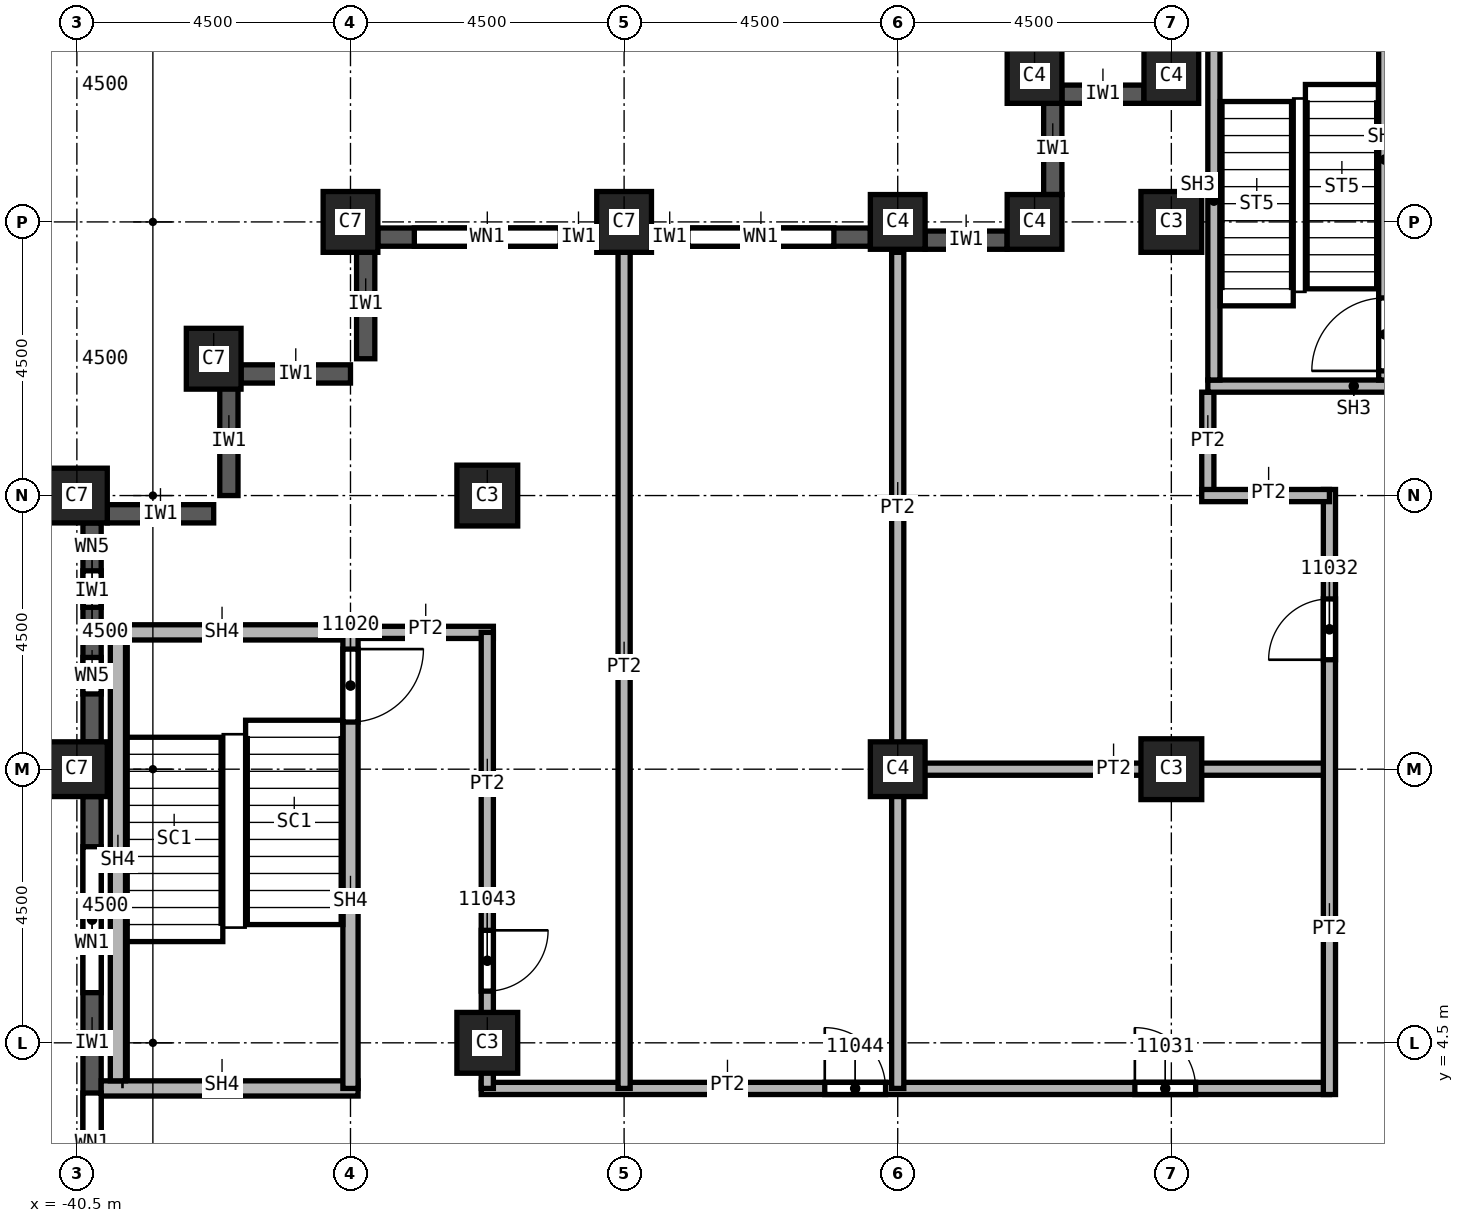
"""IFC4 building model, lengths in metres.
Left out: names, types, materials, properties, quantities, classifications, styles, units other than length and angle.
Written with IfcOpenShell. Run it as: python <this file> out.ifc"""

import sys

from ifc_helpers import new_model, si_unit, direction, frame, frame_2d, origin, origin_2d, place, context, subcontext, project, spatial, rectangle, extrude, element, fill, save


model = new_model("IFC4")
c1 = context("Model", 3, precision=1e-05, world=origin(), true_north=direction((0.0, 1.0)))
c2 = subcontext(c1, "Body", "Model", "MODEL_VIEW")
j1 = project(units=[si_unit("LENGTHUNIT", "METRE"), si_unit("PLANEANGLEUNIT", "RADIAN")], contexts=[c1])
p1 = place(None, origin())
s1 = spatial("IfcSite", under=j1, at=p1, CompositionType="ELEMENT")
p2 = place(p1, origin())
s2 = spatial("IfcBuilding", under=s1, at=p2, CompositionType="ELEMENT")
p3 = place(p2, frame((0.0, 0.0, 188.0)))
s3 = spatial("IfcBuildingStorey", under=s2, at=p3, CompositionType="ELEMENT", Elevation=188.0)
for number, where, z_axis, x_axis in (
    (1, (-40.5, 9.0, 0.0), (0.0, 0.0, 1.0), (0.0, 1.0, 0.0)),
    (2, (-40.5, 13.5, 0.0), (0.0, 0.0, 1.0), (0.0, 1.0, 0.0)),
    (3, (-38.25, 15.75, 0.0), (0.0, 0.0, 1.0), (1.0, 0.0, 0.0)),
    (4, (-31.5, 18.0, 0.0), (0.0, 0.0, 1.0), (1.0, 0.0, 0.0)),
    (5, (-36.0, 18.0, 0.0), (0.0, 0.0, 1.0), (1.0, 0.0, 0.0)),
):
    element("IfcColumn", number, at=place(p3, frame(where, z_axis=z_axis, x_axis=x_axis)), inside=s3, PredefinedType="COLUMN", context=c2, shape_type="SweptSolid", body=[
        extrude(rectangle(XDim=0.9, YDim=1.0, at=origin_2d()), origin(), (0.0, 0.0, 1.0), 3.72),
    ])
for number, where, z_axis, x_axis in (
    (6, (-33.75, 4.5, 0.0), (0.0, 0.0, 1.0), (1.0, 0.0, 0.0)),
    (7, (-33.75, 13.5, 0.0), (0.0, 0.0, 1.0), (1.0, 0.0, 0.0)),
    (8, (-22.5, 9.0, 0.0), (0.0, 0.0, 1.0), (1.0, 0.0, 0.0)),
    (9, (-22.5, 18.0, 0.0), (0.0, 0.0, 1.0), (1.0, 0.0, 0.0)),
):
    element("IfcColumn", number, at=place(p3, frame(where, z_axis=z_axis, x_axis=x_axis)), inside=s3, PredefinedType="COLUMN", context=c2, shape_type="SweptSolid", body=[
        extrude(rectangle(XDim=1.0, YDim=1.0, at=origin_2d()), origin(), (0.0, 0.0, 1.0), 3.72),
    ])
for number, where, z_axis, x_axis in (
    (10, (-27.0, 9.0, 0.0), (0.0, 0.0, 1.0), (1.0, 0.0, 0.0)),
    (11, (-27.0, 18.0, 0.0), (0.0, 0.0, 1.0), (1.0, 0.0, 0.0)),
    (12, (-22.5, 20.4, 0.0), (0.0, 0.0, 1.0), (1.0, 0.0, 0.0)),
    (13, (-24.75, 20.4, 0.0), (0.0, 0.0, 1.0), (1.0, 0.0, 0.0)),
    (14, (-24.75, 18.0, 0.0), (0.0, 0.0, 1.0), (1.0, 0.0, 0.0)),
):
    element("IfcColumn", number, at=place(p3, frame(where, z_axis=z_axis, x_axis=x_axis)), inside=s3, PredefinedType="COLUMN", context=c2, shape_type="SweptSolid", body=[
        extrude(rectangle(XDim=0.9, YDim=0.9, at=origin_2d()), origin(), (0.0, 0.0, 1.0), 3.72),
    ])
for number, where, z_axis, x_axis in (
    (15, (-35.75, 17.55, 0.0), (0.0, 0.0, 1.0), (0.0, -1.0, 0.0)),
    (16, (-37.8, 15.5, 0.0), (0.0, 0.0, 1.0), (1.0, 0.0, 0.0)),
    (17, (-38.0, 15.3, 0.0), (0.0, 0.0, 1.0), (0.0, -1.0, 0.0)),
):
    element("IfcWall", number, at=place(p3, frame(where, z_axis=z_axis, x_axis=x_axis)), inside=s3, PredefinedType="SOLIDWALL", context=c2, shape_type="SweptSolid", body=[
        extrude(rectangle(XDim=1.8, YDim=0.3, at=frame_2d((0.9, 0.0))), origin(), (0.0, 0.0, 1.0), 3.12),
    ])
p4 = place(p3, frame((-40.0, 13.2, 0.0), z_axis=(0.0, 0.0, 1.0), x_axis=(1.0, 0.0, 0.0)))
e18 = element("IfcWall", 18, at=p4, inside=s3, PredefinedType="SOLIDWALL", context=c2, shape_type="SweptSolid", body=[
    extrude(rectangle(XDim=1.75, YDim=0.3, at=frame_2d((0.875, 0.0))), origin(), (0.0, 0.0, 1.0), 3.12),
])
p5 = place(p3, frame((-22.95, 20.1, 0.0), z_axis=(0.0, 0.0, 1.0), x_axis=(-1.0, 0.0, 0.0)))
e19 = element("IfcWall", 19, at=p5, inside=s3, PredefinedType="SOLIDWALL", context=c2, shape_type="SweptSolid", body=[
    extrude(rectangle(XDim=1.35, YDim=0.3, at=frame_2d((0.675, 0.0))), origin(), (0.0, 0.0, 1.0), 3.12),
])
p6 = place(p3, frame((-24.45, 19.95, 0.0), z_axis=(0.0, 0.0, 1.0), x_axis=(0.0, -1.0, 0.0)))
e20 = element("IfcWall", 20, at=p6, inside=s3, PredefinedType="SOLIDWALL", context=c2, shape_type="SweptSolid", body=[
    extrude(rectangle(XDim=1.5, YDim=0.3, at=frame_2d((0.75, 0.0))), origin(), (0.0, 0.0, 1.0), 3.12),
])
p7 = place(p3, frame((-25.2, 17.7, 0.0), z_axis=(0.0, 0.0, 1.0), x_axis=(-1.0, 0.0, 0.0)))
e21 = element("IfcWall", 21, at=p7, inside=s3, PredefinedType="SOLIDWALL", context=c2, shape_type="SweptSolid", body=[
    extrude(rectangle(XDim=1.35, YDim=0.3, at=frame_2d((0.675, 0.0))), origin(), (0.0, 0.0, 1.0), 3.12),
])
p8 = place(p3, frame((-27.45, 17.75, 0.0), z_axis=(0.0, 0.0, 1.0), x_axis=(-1.0, 0.0, 0.0)))
e22 = element("IfcWall", 22, at=p8, inside=s3, PredefinedType="SOLIDWALL", context=c2, shape_type="SweptSolid", body=[
    extrude(rectangle(XDim=3.6, YDim=0.3, at=frame_2d((1.8, 0.0))), origin(), (0.0, 0.0, 1.0), 3.12),
])
p9 = place(p8, frame((0.6, 0.0, 0.8)))
e23 = element("IfcOpeningElement", 23, at=p9, cuts=e22, PredefinedType="OPENING", context=c2, shape_type="SweptSolid", body=[
    extrude(rectangle(XDim=2.4, YDim=1.95, at=frame_2d((1.2, 0.975))), frame((0.0, 0.15, 0.0), z_axis=(0.0, -1.0, 0.0), x_axis=(1.0, 0.0, 0.0)), (0.0, 0.0, 1.0), 0.3),
])
p10 = place(p3, frame((-31.95, 17.75, 0.0), z_axis=(0.0, 0.0, 1.0), x_axis=(-1.0, 0.0, 0.0)))
e24 = element("IfcWall", 24, at=p10, inside=s3, PredefinedType="SOLIDWALL", context=c2, shape_type="SweptSolid", body=[
    extrude(rectangle(XDim=3.6, YDim=0.3, at=frame_2d((1.8, 0.0))), origin(), (0.0, 0.0, 1.0), 3.12),
])
p11 = place(p10, frame((0.6, 0.0, 0.8)))
e25 = element("IfcOpeningElement", 25, at=p11, cuts=e24, PredefinedType="OPENING", context=c2, shape_type="SweptSolid", body=[
    extrude(rectangle(XDim=2.4, YDim=1.95, at=frame_2d((1.2, 0.975))), frame((0.0, 0.15, 0.0), z_axis=(0.0, -1.0, 0.0), x_axis=(1.0, 0.0, 0.0)), (0.0, 0.0, 1.0), 0.3),
])
p12 = place(p3, frame((-40.25, 13.05, 0.0), z_axis=(0.0, 0.0, 1.0), x_axis=(0.0, -1.0, 0.0)))
e26 = element("IfcWall", 26, at=p12, inside=s3, PredefinedType="SOLIDWALL", context=c2, shape_type="SweptSolid", body=[
    extrude(rectangle(XDim=3.6, YDim=0.3, at=frame_2d((1.8, 0.0))), origin(), (0.0, 0.0, 1.0), 3.12),
])
p13 = place(p12, frame((0.788, 0.0, 0.8)))
e27 = element("IfcOpeningElement", 27, at=p13, cuts=e26, PredefinedType="OPENING", context=c2, shape_type="SweptSolid", body=[
    extrude(rectangle(XDim=0.6, YDim=1.95, at=frame_2d((0.3, 0.975))), frame((0.0, 0.15, 0.0), z_axis=(0.0, -1.0, 0.0), x_axis=(1.0, 0.0, 0.0)), (0.0, 0.0, 1.0), 0.3),
])
p14 = place(p12, frame((2.212, 0.0, 0.8)))
e28 = element("IfcOpeningElement", 28, at=p14, cuts=e26, PredefinedType="OPENING", context=c2, shape_type="SweptSolid", body=[
    extrude(rectangle(XDim=0.6, YDim=1.95, at=frame_2d((0.3, 0.975))), frame((0.0, 0.15, 0.0), z_axis=(0.0, -1.0, 0.0), x_axis=(1.0, 0.0, 0.0)), (0.0, 0.0, 1.0), 0.3),
])
p15 = place(p3, frame((-40.25, 8.55, 0.0), z_axis=(0.0, 0.0, 1.0), x_axis=(0.0, -1.0, 0.0)))
e29 = element("IfcWall", 29, at=p15, inside=s3, PredefinedType="SOLIDWALL", context=c2, shape_type="SweptSolid", body=[
    extrude(rectangle(XDim=8.1, YDim=0.3, at=frame_2d((4.05, 0.0))), origin(), (0.0, 0.0, 1.0), 3.12),
])
p16 = place(p15, frame((0.825, 0.0, 0.8)))
e30 = element("IfcOpeningElement", 30, at=p16, cuts=e29, PredefinedType="OPENING", context=c2, shape_type="SweptSolid", body=[
    extrude(rectangle(XDim=2.4, YDim=1.95, at=frame_2d((1.2, 0.975))), frame((0.0, 0.15, 0.0), z_axis=(0.0, -1.0, 0.0), x_axis=(1.0, 0.0, 0.0)), (0.0, 0.0, 1.0), 0.3),
])
p17 = place(p15, frame((4.875, 0.0, 0.8)))
e31 = element("IfcOpeningElement", 31, at=p17, cuts=e29, PredefinedType="OPENING", context=c2, shape_type="SweptSolid", body=[
    extrude(rectangle(XDim=2.4, YDim=1.95, at=frame_2d((1.2, 0.975))), frame((0.0, 0.15, 0.0), z_axis=(0.0, -1.0, 0.0), x_axis=(1.0, 0.0, 0.0)), (0.0, 0.0, 1.0), 0.3),
])
p18 = place(p3, frame((-36.0, 11.25, 0.0), z_axis=(0.0, 0.0, 1.0), x_axis=(1.0, 0.0, 0.0)))
e32 = element("IfcWall", 32, at=p18, inside=s3, PredefinedType="PARTITIONING", context=c2, shape_type="SweptSolid", body=[
    extrude(rectangle(XDim=2.35, YDim=0.2, at=frame_2d((1.175, 0.0))), origin(), (0.0, 0.0, 1.0), 3.72),
])
p19 = place(p3, frame((-33.85, 3.75, 0.0), z_axis=(0.0, 0.0, 1.0), x_axis=(1.0, 0.0, 0.0)))
e33 = element("IfcWall", 33, at=p19, inside=s3, PredefinedType="PARTITIONING", context=c2, shape_type="SweptSolid", body=[
    extrude(rectangle(XDim=13.95, YDim=0.2, at=frame_2d((6.975, 0.0))), origin(), (0.0, 0.0, 1.0), 3.72),
])
p20 = place(p19, frame((10.75, 0.0, 0.0)))
e34 = element("IfcOpeningElement", 34, at=p20, cuts=e33, PredefinedType="OPENING", context=c2, shape_type="SweptSolid", body=[
    extrude(rectangle(XDim=1.0, YDim=2.1, at=frame_2d((0.5, 1.05))), frame((0.0, 0.1, 0.0), z_axis=(0.0, -1.0, 0.0), x_axis=(1.0, 0.0, 0.0)), (0.0, 0.0, 1.0), 0.2),
])
p21 = place(p19, frame((5.65, 0.0, 0.0)))
e35 = element("IfcOpeningElement", 35, at=p21, cuts=e33, PredefinedType="OPENING", context=c2, shape_type="SweptSolid", body=[
    extrude(rectangle(XDim=1.0, YDim=2.1, at=frame_2d((0.5, 1.05))), frame((0.0, 0.1, 0.0), z_axis=(0.0, -1.0, 0.0), x_axis=(1.0, 0.0, 0.0)), (0.0, 0.0, 1.0), 0.2),
])
p22 = place(p3, frame((-33.75, 11.25, 0.0), z_axis=(0.0, 0.0, 1.0), x_axis=(0.0, -1.0, 0.0)))
e36 = element("IfcWall", 36, at=p22, inside=s3, PredefinedType="PARTITIONING", context=c2, shape_type="SweptSolid", body=[
    extrude(rectangle(XDim=7.5, YDim=0.2, at=frame_2d((3.75, 0.0))), origin(), (0.0, 0.0, 1.0), 3.72),
])
p23 = place(p22, frame((4.9, 0.0, 0.0)))
e37 = element("IfcOpeningElement", 37, at=p23, cuts=e36, PredefinedType="OPENING", context=c2, shape_type="SweptSolid", body=[
    extrude(rectangle(XDim=1.0, YDim=2.1, at=frame_2d((0.5, 1.05))), frame((0.0, 0.1, 0.0), z_axis=(0.0, -1.0, 0.0), x_axis=(1.0, 0.0, 0.0)), (0.0, 0.0, 1.0), 0.2),
])
p24 = place(p3, frame((-31.5, 17.5, 0.0), z_axis=(0.0, 0.0, 1.0), x_axis=(0.0, -1.0, 0.0)))
e38 = element("IfcWall", 38, at=p24, inside=s3, PredefinedType="PARTITIONING", context=c2, shape_type="SweptSolid", body=[
    extrude(rectangle(XDim=13.75, YDim=0.2, at=frame_2d((6.875, 0.0))), origin(), (0.0, 0.0, 1.0), 3.72),
])
p25 = place(p3, frame((-27.1, 9.0, 0.0), z_axis=(0.0, 0.0, 1.0), x_axis=(1.0, 0.0, 0.0)))
e39 = element("IfcWall", 39, at=p25, inside=s3, PredefinedType="PARTITIONING", context=c2, shape_type="SweptSolid", body=[
    extrude(rectangle(XDim=7.2, YDim=0.2, at=frame_2d((3.6, 0.0))), origin(), (0.0, 0.0, 1.0), 3.72),
])
p26 = place(p3, frame((-27.0, 3.75, 0.0), z_axis=(0.0, 0.0, 1.0), x_axis=(0.0, 1.0, 0.0)))
e40 = element("IfcWall", 40, at=p26, inside=s3, PredefinedType="PARTITIONING", context=c2, shape_type="SweptSolid", body=[
    extrude(rectangle(XDim=13.75, YDim=0.2, at=frame_2d((6.875, 0.0))), origin(), (0.0, 0.0, 1.0), 3.72),
])
p27 = place(p3, frame((-21.9, 13.5, 0.0), z_axis=(0.0, 0.0, 1.0), x_axis=(0.0, 1.0, 0.0)))
e41 = element("IfcWall", 41, at=p27, inside=s3, PredefinedType="PARTITIONING", context=c2, shape_type="SweptSolid", body=[
    extrude(rectangle(XDim=1.7, YDim=0.2, at=frame_2d((0.85, 0.0))), origin(), (0.0, 0.0, 1.0), 3.72),
])
p28 = place(p3, frame((-19.9, 3.65, 0.0), z_axis=(0.0, 0.0, 1.0), x_axis=(0.0, 1.0, 0.0)))
e42 = element("IfcWall", 42, at=p28, inside=s3, PredefinedType="PARTITIONING", context=c2, shape_type="SweptSolid", body=[
    extrude(rectangle(XDim=9.95, YDim=0.2, at=frame_2d((4.975, 0.0))), origin(), (0.0, 0.0, 1.0), 3.72),
])
p29 = place(p28, frame((7.15, 0.0, 0.0)))
e43 = element("IfcOpeningElement", 43, at=p29, cuts=e42, PredefinedType="OPENING", context=c2, shape_type="SweptSolid", body=[
    extrude(rectangle(XDim=1.0, YDim=2.1, at=frame_2d((0.5, 1.05))), frame((0.0, 0.1, 0.0), z_axis=(0.0, -1.0, 0.0), x_axis=(1.0, 0.0, 0.0)), (0.0, 0.0, 1.0), 0.2),
])
p30 = place(p3, frame((-19.9, 13.5, 0.0), z_axis=(0.0, 0.0, 1.0), x_axis=(-1.0, 0.0, 0.0)))
e44 = element("IfcWall", 44, at=p30, inside=s3, PredefinedType="PARTITIONING", context=c2, shape_type="SweptSolid", body=[
    extrude(rectangle(XDim=2.1, YDim=0.2, at=frame_2d((1.05, 0.0))), origin(), (0.0, 0.0, 1.0), 3.72),
])
p31 = place(p3, frame((-40.1, 3.75, 0.0), z_axis=(0.0, 0.0, 1.0), x_axis=(1.0, 0.0, 0.0)))
e45 = element("IfcWall", 45, at=p31, inside=s3, PredefinedType="SOLIDWALL", context=c2, shape_type="SweptSolid", body=[
    extrude(rectangle(XDim=4.225, YDim=0.25, at=frame_2d((2.113, 0.0))), origin(), (0.0, 0.0, 1.0), 3.72),
])
p32 = place(p3, frame((-40.1, 11.25, 0.0), z_axis=(0.0, 0.0, 1.0), x_axis=(1.0, 0.0, 0.0)))
e46 = element("IfcWall", 46, at=p32, inside=s3, PredefinedType="SOLIDWALL", context=c2, shape_type="SweptSolid", body=[
    extrude(rectangle(XDim=4.1, YDim=0.25, at=frame_2d((2.05, 0.0))), origin(), (0.0, 0.0, 1.0), 3.72),
])
p33 = place(p3, frame((-36.0, 11.375, 0.0), z_axis=(0.0, 0.0, 1.0), x_axis=(0.0, -1.0, 0.0)))
e47 = element("IfcWall", 47, at=p33, inside=s3, PredefinedType="SOLIDWALL", context=c2, shape_type="SweptSolid", body=[
    extrude(rectangle(XDim=7.625, YDim=0.25, at=frame_2d((3.812, 0.0))), origin(), (0.0, 0.0, 1.0), 3.72),
])
p34 = place(p33, frame((0.4, 0.0, 0.0)))
e48 = element("IfcOpeningElement", 48, at=p34, cuts=e47, PredefinedType="OPENING", context=c2, shape_type="SweptSolid", body=[
    extrude(rectangle(XDim=1.2, YDim=2.1, at=frame_2d((0.6, 1.05))), frame((0.0, 0.125, 0.0), z_axis=(0.0, -1.0, 0.0), x_axis=(1.0, 0.0, 0.0)), (0.0, 0.0, 1.0), 0.25),
])
p35 = place(p3, frame((-21.9, 15.3, 0.0), z_axis=(0.0, 0.0, 1.0), x_axis=(1.0, 0.0, 0.0)))
e49 = element("IfcWall", 49, at=p35, inside=s3, PredefinedType="SOLIDWALL", context=c2, shape_type="SweptSolid", body=[
    extrude(rectangle(XDim=8.275, YDim=0.2, at=frame_2d((4.137, 0.0))), origin(), (0.0, 0.0, 1.0), 3.72),
])
p36 = place(p35, frame((4.8, 0.0, 0.0)))
e50 = element("IfcOpeningElement", 50, at=p36, cuts=e49, PredefinedType="OPENING", context=c2, shape_type="SweptSolid", body=[
    extrude(rectangle(XDim=1.2, YDim=2.1, at=frame_2d((0.6, 1.05))), frame((0.0, 0.1, 0.0), z_axis=(0.0, -1.0, 0.0), x_axis=(1.0, 0.0, 0.0)), (0.0, 0.0, 1.0), 0.2),
])
p37 = place(p3, frame((-21.8, 15.4, 0.0), z_axis=(0.0, 0.0, 1.0), x_axis=(0.0, 1.0, 0.0)))
e51 = element("IfcWall", 51, at=p37, inside=s3, PredefinedType="SOLIDWALL", context=c2, shape_type="SweptSolid", body=[
    extrude(rectangle(XDim=5.9, YDim=0.2, at=frame_2d((2.95, 0.0))), origin(), (0.0, 0.0, 1.0), 3.72),
])
p38 = place(p3, frame((-18.99, 15.4, 0.0), z_axis=(0.0, 0.0, 1.0), x_axis=(0.0, 1.0, 0.0)))
e52 = element("IfcWall", 52, at=p38, inside=s3, PredefinedType="SOLIDWALL", context=c2, shape_type="SweptSolid", body=[
    extrude(rectangle(XDim=5.9, YDim=0.2, at=frame_2d((2.95, 0.0))), origin(), (0.0, 0.0, 1.0), 3.72),
])
p39 = place(p38, frame((0.15, 0.0, 0.0)))
e53 = element("IfcOpeningElement", 53, at=p39, cuts=e52, PredefinedType="OPENING", context=c2, shape_type="SweptSolid", body=[
    extrude(rectangle(XDim=1.2, YDim=2.1, at=frame_2d((0.6, 1.05))), frame((0.0, 0.1, 0.0), z_axis=(0.0, -1.0, 0.0), x_axis=(1.0, 0.0, 0.0)), (0.0, 0.0, 1.0), 0.2),
])
p40 = place(p3, frame((-39.825, 3.875, 0.0), z_axis=(0.0, 0.0, 1.0), x_axis=(0.0, 1.0, 0.0)))
e54 = element("IfcWall", 54, at=p40, inside=s3, PredefinedType="SOLIDWALL", context=c2, shape_type="SweptSolid", body=[
    extrude(rectangle(XDim=7.25, YDim=0.25, at=frame_2d((3.625, 0.0))), origin(), (0.0, 0.0, 1.0), 3.72),
])
p41 = place(p9, origin())
e55 = element("IfcWindow", 55, at=p41, inside=s3, PartitioningType="SINGLE_PANEL", PredefinedType="WINDOW", context=c2, shape_type="SweptSolid", body=[
    extrude(rectangle(XDim=2.4, YDim=1.95, at=frame_2d((1.2, 0.975))), frame((0.0, 0.03, 0.0), z_axis=(0.0, -1.0, 0.0), x_axis=(1.0, 0.0, 0.0)), (0.0, 0.0, 1.0), 0.06),
])
fill(e23, e55)
p42 = place(p11, origin())
e56 = element("IfcWindow", 56, at=p42, inside=s3, PartitioningType="SINGLE_PANEL", PredefinedType="WINDOW", context=c2, shape_type="SweptSolid", body=[
    extrude(rectangle(XDim=2.4, YDim=1.95, at=frame_2d((1.2, 0.975))), frame((0.0, 0.03, 0.0), z_axis=(0.0, -1.0, 0.0), x_axis=(1.0, 0.0, 0.0)), (0.0, 0.0, 1.0), 0.06),
])
fill(e25, e56)
p43 = place(p16, origin())
e57 = element("IfcWindow", 57, at=p43, inside=s3, PartitioningType="SINGLE_PANEL", PredefinedType="WINDOW", context=c2, shape_type="SweptSolid", body=[
    extrude(rectangle(XDim=2.4, YDim=1.95, at=frame_2d((1.2, 0.975))), frame((0.0, 0.03, 0.0), z_axis=(0.0, -1.0, 0.0), x_axis=(1.0, 0.0, 0.0)), (0.0, 0.0, 1.0), 0.06),
])
fill(e30, e57)
p44 = place(p17, origin())
e58 = element("IfcWindow", 58, at=p44, inside=s3, PartitioningType="SINGLE_PANEL", PredefinedType="WINDOW", context=c2, shape_type="SweptSolid", body=[
    extrude(rectangle(XDim=2.4, YDim=1.95, at=frame_2d((1.2, 0.975))), frame((0.0, 0.03, 0.0), z_axis=(0.0, -1.0, 0.0), x_axis=(1.0, 0.0, 0.0)), (0.0, 0.0, 1.0), 0.06),
])
fill(e31, e58)
p45 = place(p34, origin())
e59 = element("IfcDoor", 59, at=p45, inside=s3, OperationType="SINGLE_SWING_LEFT", PredefinedType="DOOR", context=c2, shape_type="SweptSolid", body=[
    extrude(rectangle(XDim=1.2, YDim=2.1, at=frame_2d((0.6, 1.05))), frame((0.0, 0.025, 0.0), z_axis=(0.0, -1.0, 0.0), x_axis=(1.0, 0.0, 0.0)), (0.0, 0.0, 1.0), 0.05),
])
fill(e48, e59)
p46 = place(p20, origin())
e60 = element("IfcDoor", 60, at=p46, inside=s3, OperationType="SINGLE_SWING_RIGHT", PredefinedType="DOOR", context=c2, shape_type="SweptSolid", body=[
    extrude(rectangle(XDim=1.0, YDim=2.1, at=frame_2d((0.5, 1.05))), frame((0.0, 0.025, 0.0), z_axis=(0.0, -1.0, 0.0), x_axis=(1.0, 0.0, 0.0)), (0.0, 0.0, 1.0), 0.05),
])
fill(e34, e60)
p47 = place(p29, origin())
e61 = element("IfcDoor", 61, at=p47, inside=s3, OperationType="SINGLE_SWING_LEFT", PredefinedType="DOOR", context=c2, shape_type="SweptSolid", body=[
    extrude(rectangle(XDim=1.0, YDim=2.1, at=frame_2d((0.5, 1.05))), frame((0.0, 0.025, 0.0), z_axis=(0.0, -1.0, 0.0), x_axis=(1.0, 0.0, 0.0)), (0.0, 0.0, 1.0), 0.05),
])
fill(e43, e61)
p48 = place(p23, origin())
e62 = element("IfcDoor", 62, at=p48, inside=s3, OperationType="SINGLE_SWING_RIGHT", PredefinedType="DOOR", context=c2, shape_type="SweptSolid", body=[
    extrude(rectangle(XDim=1.0, YDim=2.1, at=frame_2d((0.5, 1.05))), frame((0.0, 0.025, 0.0), z_axis=(0.0, -1.0, 0.0), x_axis=(1.0, 0.0, 0.0)), (0.0, 0.0, 1.0), 0.05),
])
fill(e37, e62)
p49 = place(p21, origin())
e63 = element("IfcDoor", 63, at=p49, inside=s3, OperationType="SINGLE_SWING_LEFT", PredefinedType="DOOR", context=c2, shape_type="SweptSolid", body=[
    extrude(rectangle(XDim=1.0, YDim=2.1, at=frame_2d((0.5, 1.05))), frame((0.0, 0.025, 0.0), z_axis=(0.0, -1.0, 0.0), x_axis=(1.0, 0.0, 0.0)), (0.0, 0.0, 1.0), 0.05),
])
fill(e35, e63)
p50 = place(p39, origin())
e64 = element("IfcDoor", 64, at=p50, inside=s3, OperationType="SINGLE_SWING_LEFT", PredefinedType="DOOR", context=c2, shape_type="SweptSolid", body=[
    extrude(rectangle(XDim=1.2, YDim=2.1, at=frame_2d((0.6, 1.05))), frame((0.0, 0.025, 0.0), z_axis=(0.0, -1.0, 0.0), x_axis=(1.0, 0.0, 0.0)), (0.0, 0.0, 1.0), 0.05),
])
fill(e53, e64)
p51 = place(p13, origin())
e65 = element("IfcWindow", 65, at=p51, inside=s3, PartitioningType="SINGLE_PANEL", PredefinedType="WINDOW", context=c2, shape_type="SweptSolid", body=[
    extrude(rectangle(XDim=0.6, YDim=1.95, at=frame_2d((0.3, 0.975))), frame((0.0, 0.03, 0.0), z_axis=(0.0, -1.0, 0.0), x_axis=(1.0, 0.0, 0.0)), (0.0, 0.0, 1.0), 0.06),
])
fill(e27, e65)
p52 = place(p14, origin())
e66 = element("IfcWindow", 66, at=p52, inside=s3, PartitioningType="SINGLE_PANEL", PredefinedType="WINDOW", context=c2, shape_type="SweptSolid", body=[
    extrude(rectangle(XDim=0.6, YDim=1.95, at=frame_2d((0.3, 0.975))), frame((0.0, 0.03, 0.0), z_axis=(0.0, -1.0, 0.0), x_axis=(1.0, 0.0, 0.0)), (0.0, 0.0, 1.0), 0.06),
])
fill(e28, e66)
save(model, sys.argv[1])
